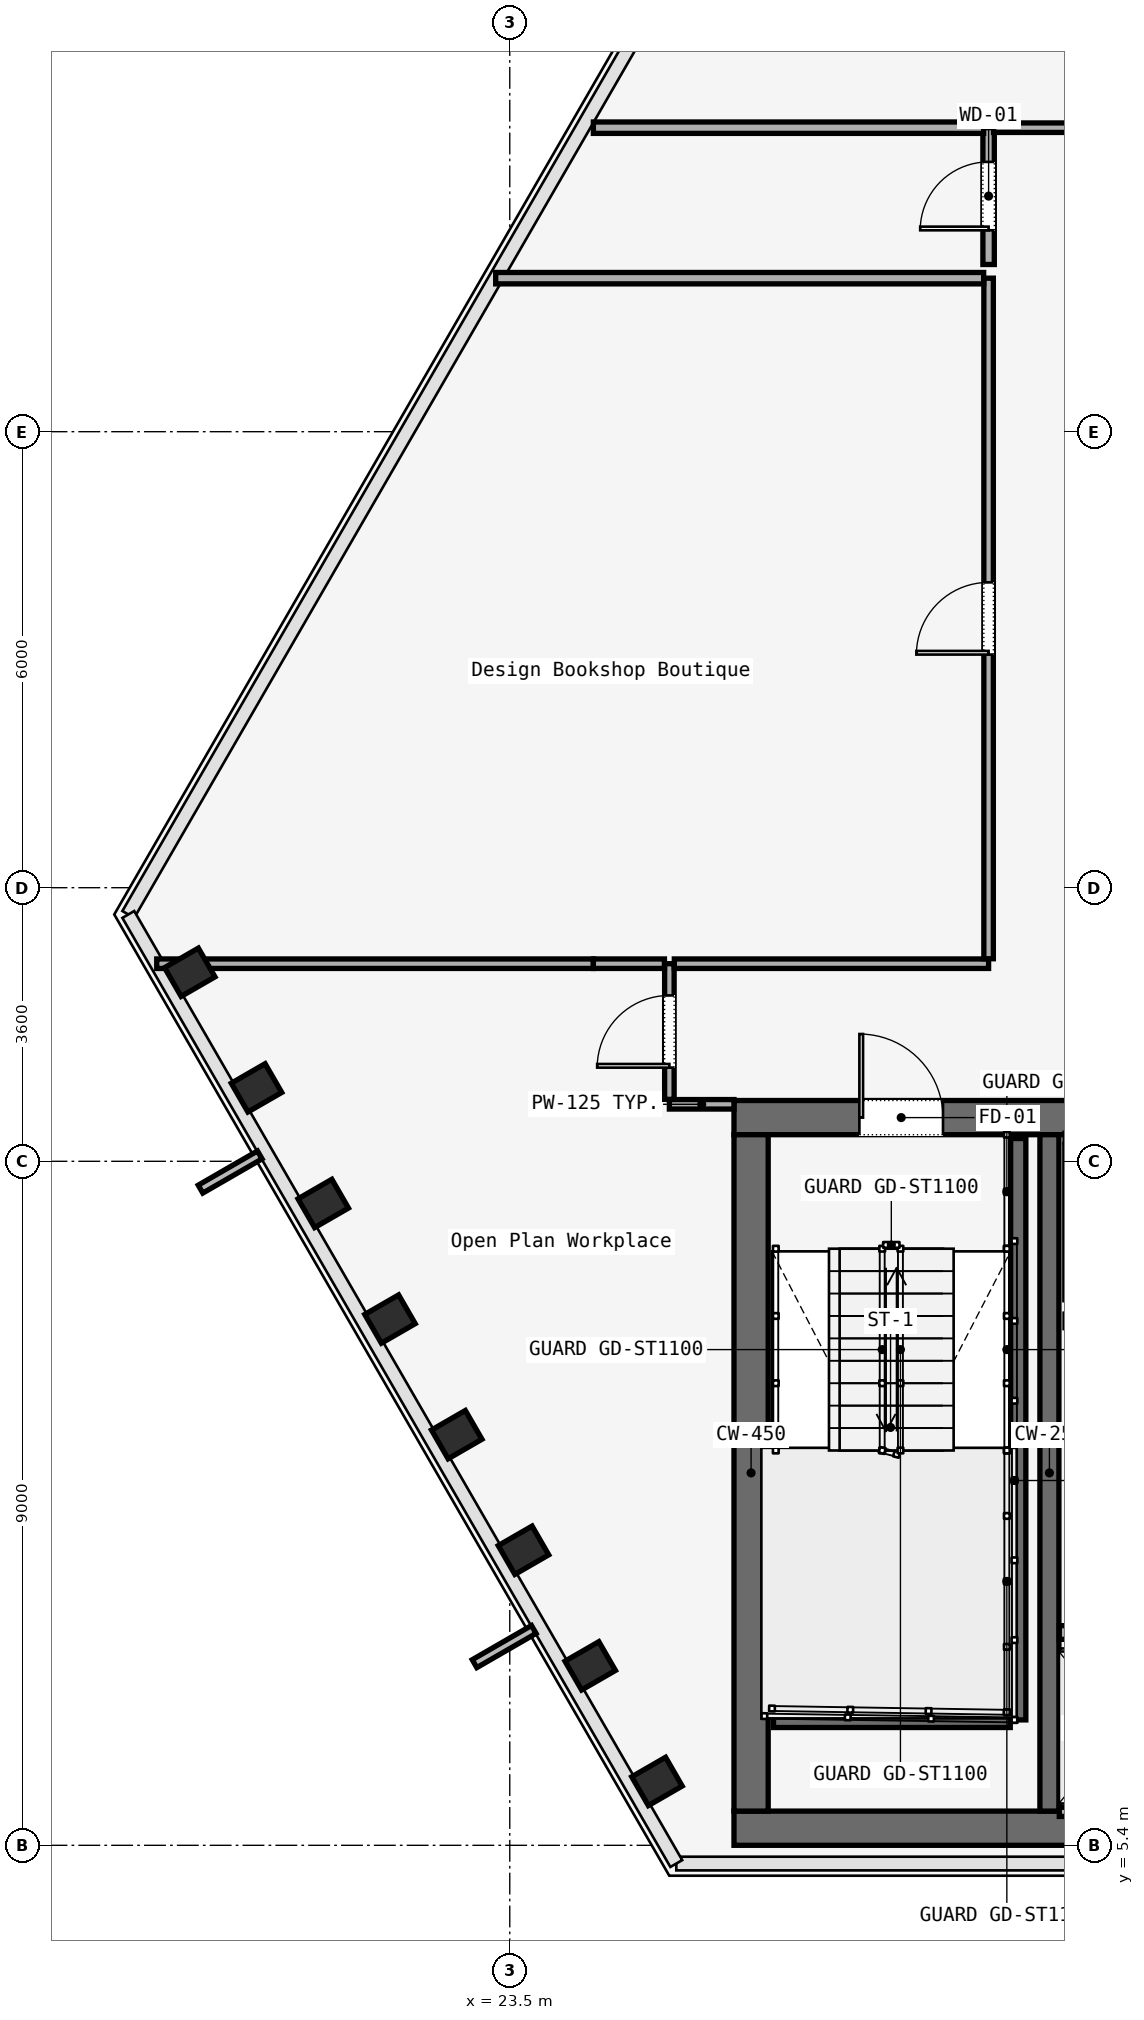
"""IFC4 building model, lengths in metres.
Left out: names, types, materials, properties, quantities, classifications, styles, units other than length and angle.
Written with IfcOpenShell. Run it as: python <this file> out.ifc"""

import sys

from ifc_helpers import new_model, si_unit, direction, frame, frame_2d, origin, origin_2d, place, context, subcontext, project, spatial, rectangle, i_section, extrude, element, fill, save


model = new_model("IFC4")
c1 = context("Model", 3, precision=1e-05, world=origin(), true_north=direction((0.0, 1.0)))
c2 = subcontext(c1, "Body", "Model", "MODEL_VIEW")
j1 = project(units=[si_unit("LENGTHUNIT", "METRE"), si_unit("PLANEANGLEUNIT", "RADIAN")], contexts=[c1])
p1 = place(None, origin())
s1 = spatial("IfcSite", under=j1, at=p1, CompositionType="ELEMENT")
p2 = place(p1, origin())
s2 = spatial("IfcBuilding", under=s1, at=p2, CompositionType="ELEMENT")
p3 = place(p2, frame((0.0, 0.0, 89.2)))
s3 = spatial("IfcBuildingStorey", under=s2, at=p3, CompositionType="ELEMENT", Elevation=89.2)
p4 = place(p3, frame((26.45, 14.975, 0.0), z_axis=(0.0, 0.0, 1.0), x_axis=(1.0, 0.0, 0.0)))
e1 = element("IfcWall", 1, at=p4, inside=s3, PredefinedType="SOLIDWALL", context=c2, shape_type="SweptSolid", body=[
    extrude(rectangle(XDim=31.1, YDim=0.45, at=frame_2d((15.55, 0.0))), origin(), (0.0, 0.0, 1.0), 3.58),
])
p5 = place(p4, frame((1.65, 0.0, 0.0)))
e2 = element("IfcOpeningElement", 2, at=p5, cuts=e1, PredefinedType="OPENING", context=c2, shape_type="SweptSolid", body=[
    extrude(rectangle(XDim=1.1, YDim=2.2, at=frame_2d((0.55, 1.1))), frame((0.0, 0.225, 0.0), z_axis=(0.0, -1.0, 0.0), x_axis=(1.0, 0.0, 0.0)), (0.0, 0.0, 1.0), 0.45),
])
p6 = place(p4, frame((13.65, 0.0, 0.0)))
e3 = element("IfcOpeningElement", 3, at=p6, cuts=e1, PredefinedType="OPENING", context=c2, shape_type="SweptSolid", body=[
    extrude(rectangle(XDim=1.1, YDim=2.2, at=frame_2d((0.55, 1.1))), frame((0.0, 0.225, 0.0), z_axis=(0.0, -1.0, 0.0), x_axis=(1.0, 0.0, 0.0)), (0.0, 0.0, 1.0), 0.45),
])
p7 = place(p4, frame((25.55, 0.0, 0.0)))
e4 = element("IfcOpeningElement", 4, at=p7, cuts=e1, PredefinedType="OPENING", context=c2, shape_type="SweptSolid", body=[
    extrude(rectangle(XDim=1.1, YDim=2.2, at=frame_2d((0.55, 1.1))), frame((0.0, 0.225, 0.0), z_axis=(0.0, -1.0, 0.0), x_axis=(1.0, 0.0, 0.0)), (0.0, 0.0, 1.0), 0.45),
])
p8 = place(p4, frame((10.7, 0.0, 0.0)))
e5 = element("IfcOpeningElement", 5, at=p8, cuts=e1, PredefinedType="OPENING", context=c2, shape_type="SweptSolid", body=[
    extrude(rectangle(XDim=1.4, YDim=2.2, at=frame_2d((0.7, 1.1))), frame((0.0, 0.225, 0.0), z_axis=(0.0, -1.0, 0.0), x_axis=(1.0, 0.0, 0.0)), (0.0, 0.0, 1.0), 0.45),
])
p9 = place(p4, frame((19.35, 0.0, 0.0)))
e6 = element("IfcOpeningElement", 6, at=p9, cuts=e1, PredefinedType="OPENING", context=c2, shape_type="SweptSolid", body=[
    extrude(rectangle(XDim=1.1, YDim=2.2, at=frame_2d((0.55, 1.1))), frame((0.0, 0.225, 0.0), z_axis=(0.0, -1.0, 0.0), x_axis=(1.0, 0.0, 0.0)), (0.0, 0.0, 1.0), 0.45),
])
p10 = place(p4, frame((21.4, 0.0, 0.0)))
e7 = element("IfcOpeningElement", 7, at=p10, cuts=e1, PredefinedType="OPENING", context=c2, shape_type="SweptSolid", body=[
    extrude(rectangle(XDim=0.9, YDim=2.1, at=frame_2d((0.45, 1.05))), frame((0.0, 0.225, 0.0), z_axis=(0.0, -1.0, 0.0), x_axis=(1.0, 0.0, 0.0)), (0.0, 0.0, 1.0), 0.45),
])
p11 = place(p4, frame((23.35, 0.0, 0.0)))
e8 = element("IfcOpeningElement", 8, at=p11, cuts=e1, PredefinedType="OPENING", context=c2, shape_type="SweptSolid", body=[
    extrude(rectangle(XDim=1.3, YDim=2.3, at=frame_2d((0.65, 1.15))), frame((0.0, 0.225, 0.0), z_axis=(0.0, -1.0, 0.0), x_axis=(1.0, 0.0, 0.0)), (0.0, 0.0, 1.0), 0.45),
])
p12 = place(p3, frame((26.45, 5.625, 0.0), z_axis=(0.0, 0.0, 1.0), x_axis=(1.0, 0.0, 0.0)))
e9 = element("IfcWall", 9, at=p12, inside=s3, PredefinedType="SOLIDWALL", context=c2, shape_type="SweptSolid", body=[
    extrude(rectangle(XDim=31.1, YDim=0.45, at=frame_2d((15.55, 0.0))), origin(), (0.0, 0.0, 1.0), 3.58),
])
p13 = place(p3, frame((26.675, 5.85, 0.0), z_axis=(0.0, 0.0, 1.0), x_axis=(0.0, 1.0, 0.0)))
e10 = element("IfcWall", 10, at=p13, inside=s3, PredefinedType="SOLIDWALL", context=c2, shape_type="SweptSolid", body=[
    extrude(rectangle(XDim=8.9, YDim=0.45, at=frame_2d((4.45, 0.0))), origin(), (0.0, 0.0, 1.0), 3.58),
])
p14 = place(p3, frame((30.6, 5.85, 0.0), z_axis=(0.0, 0.0, 1.0), x_axis=(0.0, 1.0, 0.0)))
e11 = element("IfcWall", 11, at=p14, inside=s3, PredefinedType="SOLIDWALL", context=c2, shape_type="SweptSolid", body=[
    extrude(rectangle(XDim=8.9, YDim=0.25, at=frame_2d((4.45, 0.0))), origin(), (0.0, 0.0, 1.0), 3.58),
])
p15 = place(p3, frame((19.29, 16.887, 0.0), z_axis=(-0.011025598109, -0.126557632283, 0.991897979581), x_axis=(-0.423559529264, 0.899162680827, 0.110017264904)))
e12 = element("IfcColumn", 12, at=p15, inside=s3, PredefinedType="COLUMN", context=c2, shape_type="SweptSolid", body=[
    extrude(i_section(OverallWidth=0.437, OverallDepth=0.514, WebThickness=0.061, FlangeThickness=0.077, FilletRadius=0.015, at=origin_2d()), origin(), (0.0, 0.0, 1.0), 3.609),
])
p16 = place(p3, frame((20.168, 15.366, 0.0), z_axis=(-0.020804367699, -0.109849772116, 0.993730449292), x_axis=(-0.331126240507, 0.938605650545, 0.096823786395)))
e13 = element("IfcColumn", 13, at=p16, inside=s3, PredefinedType="COLUMN", context=c2, shape_type="SweptSolid", body=[
    extrude(i_section(OverallWidth=0.437, OverallDepth=0.514, WebThickness=0.061, FlangeThickness=0.077, FilletRadius=0.015, at=origin_2d()), origin(), (0.0, 0.0, 1.0), 3.603),
])
p17 = place(p3, frame((21.046, 13.845, 0.0), z_axis=(-0.030539703682, -0.093112163226, 0.995187143988), x_axis=(-0.206497376951, 0.974759930435, 0.084864075622)))
e14 = element("IfcColumn", 14, at=p17, inside=s3, PredefinedType="COLUMN", context=c2, shape_type="SweptSolid", body=[
    extrude(i_section(OverallWidth=0.437, OverallDepth=0.514, WebThickness=0.061, FlangeThickness=0.077, FilletRadius=0.015, at=origin_2d()), origin(), (0.0, 0.0, 1.0), 3.597),
])
p18 = place(p3, frame((21.924, 12.324, 0.0), z_axis=(-0.040424026835, -0.076296104429, 0.996265427737), x_axis=(-0.037878466592, 0.996480719154, 0.074775651936)))
e15 = element("IfcColumn", 15, at=p18, inside=s3, PredefinedType="COLUMN", context=c2, shape_type="SweptSolid", body=[
    extrude(i_section(OverallWidth=0.437, OverallDepth=0.514, WebThickness=0.061, FlangeThickness=0.077, FilletRadius=0.015, at=origin_2d()), origin(), (0.0, 0.0, 1.0), 3.594),
])
p19 = place(p3, frame((22.802, 10.803, 0.0), z_axis=(-0.050175104004, -0.059353476687, 0.996975237277), x_axis=(0.175563131942, 0.982164601536, 0.067307371012)))
e16 = element("IfcColumn", 16, at=p19, inside=s3, PredefinedType="COLUMN", context=c2, shape_type="SweptSolid", body=[
    extrude(i_section(OverallWidth=0.437, OverallDepth=0.514, WebThickness=0.061, FlangeThickness=0.077, FilletRadius=0.015, at=origin_2d()), origin(), (0.0, 0.0, 1.0), 3.591),
])
p20 = place(p3, frame((23.68, 9.282, 0.0), z_axis=(-0.059984707223, -0.042438160212, 0.997296764989), x_axis=(0.41629274108, 0.907001092511, 0.063634675352)))
e17 = element("IfcColumn", 17, at=p20, inside=s3, PredefinedType="COLUMN", context=c2, shape_type="SweptSolid", body=[
    extrude(i_section(OverallWidth=0.437, OverallDepth=0.514, WebThickness=0.061, FlangeThickness=0.077, FilletRadius=0.015, at=origin_2d()), origin(), (0.0, 0.0, 1.0), 3.59),
])
p21 = place(p3, frame((24.559, 7.761, 0.0), z_axis=(-0.069841728492, -0.02543408613, 0.997233794165), x_axis=(0.640403196751, 0.765336642111, 0.064370566504)))
e18 = element("IfcColumn", 18, at=p21, inside=s3, PredefinedType="COLUMN", context=c2, shape_type="SweptSolid", body=[
    extrude(i_section(OverallWidth=0.437, OverallDepth=0.514, WebThickness=0.061, FlangeThickness=0.077, FilletRadius=0.015, at=origin_2d()), origin(), (0.0, 0.0, 1.0), 3.59),
])
p22 = place(p3, frame((25.437, 6.24, 0.0), z_axis=(-0.079599151352, -0.008496920511, 0.996790739045), x_axis=(0.805297814331, 0.588803246695, 0.069326523896)))
e19 = element("IfcColumn", 19, at=p22, inside=s3, PredefinedType="COLUMN", context=c2, shape_type="SweptSolid", body=[
    extrude(i_section(OverallWidth=0.437, OverallDepth=0.514, WebThickness=0.061, FlangeThickness=0.077, FilletRadius=0.015, at=origin_2d()), origin(), (0.0, 0.0, 1.0), 3.592),
])
p23 = place(p3, frame((30.19, 14.7, 0.0), z_axis=(0.0, 0.0, 1.0), x_axis=(0.0, -1.0, 0.0)))
e20 = element("IfcWall", 20, at=p23, inside=s3, PredefinedType="SOLIDWALL", context=c2, shape_type="SweptSolid", body=[
    extrude(rectangle(XDim=7.65, YDim=0.2, at=frame_2d((3.825, 0.0))), origin(), (0.0, 0.0, 1.0), 3.8),
])
p24 = place(p3, frame((26.97, 7.05, 0.0), z_axis=(0.0, 0.0, 1.0), x_axis=(1.0, 0.0, 0.0)))
e21 = element("IfcWall", 21, at=p24, inside=s3, PredefinedType="SOLIDWALL", context=c2, shape_type="SweptSolid", body=[
    extrude(rectangle(XDim=3.115, YDim=0.2, at=frame_2d((1.558, 0.0))), origin(), (0.0, 0.0, 1.0), 3.8),
])
p25 = place(p3, frame((30.73, 8.2, 0.0), z_axis=(0.0, 0.0, 1.0), x_axis=(1.0, 0.0, 0.0)))
e22 = element("IfcWall", 22, at=p25, inside=s3, PredefinedType="SOLIDWALL", context=c2, shape_type="SweptSolid", body=[
    extrude(rectangle(XDim=1.665, YDim=0.18, at=frame_2d((0.833, 0.0))), origin(), (0.0, 0.0, 1.0), 2.95),
])
p26 = place(p25, frame((0.282, 0.0, 0.0)))
e23 = element("IfcOpeningElement", 23, at=p26, cuts=e22, PredefinedType="OPENING", context=c2, shape_type="SweptSolid", body=[
    extrude(rectangle(XDim=1.1, YDim=2.2, at=frame_2d((0.55, 1.1))), frame((0.0, 0.09, 0.0), z_axis=(0.0, -1.0, 0.0), x_axis=(1.0, 0.0, 0.0)), (0.0, 0.0, 1.0), 0.18),
])
p27 = place(p3, frame((30.73, 5.84, 0.0), z_axis=(0.0, 0.0, 1.0), x_axis=(1.0, 0.0, 0.0)))
e24 = element("IfcWall", 24, at=p27, inside=s3, PredefinedType="SOLIDWALL", context=c2, shape_type="SweptSolid", body=[
    extrude(rectangle(XDim=1.665, YDim=0.12, at=frame_2d((0.833, 0.0))), origin(), (0.0, 0.0, 1.0), 2.95),
])
p28 = place(p3, frame((26.45, 15.15, 0.0), z_axis=(0.0, 0.0, 1.0), x_axis=(-1.0, 0.0, 0.0)))
e25 = element("IfcWall", 25, at=p28, inside=s3, PredefinedType="PARTITIONING", context=c2, shape_type="SweptSolid", body=[
    extrude(rectangle(XDim=0.85, YDim=0.125, at=frame_2d((0.425, 0.0))), origin(), (0.0, 0.0, 1.0), 2.95),
])
p29 = place(p3, frame((25.6, 15.215, 0.0), z_axis=(0.0, 0.0, 1.0), x_axis=(0.0, 1.0, 0.0)))
e26 = element("IfcWall", 26, at=p29, inside=s3, PredefinedType="PARTITIONING", context=c2, shape_type="SweptSolid", body=[
    extrude(rectangle(XDim=1.785, YDim=0.125, at=frame_2d((0.893, 0.0))), origin(), (0.0, 0.0, 1.0), 2.95),
])
p30 = place(p29, frame((0.417, 0.0, 0.0)))
e27 = element("IfcOpeningElement", 27, at=p30, cuts=e26, PredefinedType="OPENING", context=c2, shape_type="SweptSolid", body=[
    extrude(rectangle(XDim=0.95, YDim=2.2, at=frame_2d((0.475, 1.1))), frame((0.0, 0.062, 0.0), z_axis=(0.0, -1.0, 0.0), x_axis=(1.0, 0.0, 0.0)), (0.0, 0.0, 1.0), 0.125),
])
p31 = place(p3, frame((25.665, 17.0, 0.0), z_axis=(0.0, 0.0, 1.0), x_axis=(1.0, 0.0, 0.0)))
e28 = element("IfcWall", 28, at=p31, inside=s3, PredefinedType="PARTITIONING", context=c2, shape_type="SweptSolid", body=[
    extrude(rectangle(XDim=4.135, YDim=0.125, at=frame_2d((2.067, 0.0))), origin(), (0.0, 0.0, 1.0), 2.95),
])
p32 = place(p3, frame((29.8, 17.065, 0.0), z_axis=(0.0, 0.0, 1.0), x_axis=(0.0, 1.0, 0.0)))
e29 = element("IfcWall", 29, at=p32, inside=s3, PredefinedType="PARTITIONING", context=c2, shape_type="SweptSolid", body=[
    extrude(rectangle(XDim=8.955, YDim=0.125, at=frame_2d((4.478, 0.0))), origin(), (0.0, 0.0, 1.0), 2.95),
])
p33 = place(p32, frame((4.002, 0.0, 0.0)))
e30 = element("IfcOpeningElement", 30, at=p33, cuts=e29, PredefinedType="OPENING", context=c2, shape_type="SweptSolid", body=[
    extrude(rectangle(XDim=0.95, YDim=2.2, at=frame_2d((0.475, 1.1))), frame((0.0, 0.062, 0.0), z_axis=(0.0, -1.0, 0.0), x_axis=(1.0, 0.0, 0.0)), (0.0, 0.0, 1.0), 0.125),
])
p34 = place(p3, frame((29.8, 26.2, 0.0), z_axis=(0.0, 0.0, 1.0), x_axis=(0.0, 1.0, 0.0)))
e31 = element("IfcWall", 31, at=p34, inside=s3, PredefinedType="PARTITIONING", context=c2, shape_type="SweptSolid", body=[
    extrude(rectangle(XDim=1.8, YDim=0.15, at=frame_2d((0.9, 0.0))), origin(), (0.0, 0.0, 1.0), 2.95),
])
p35 = place(p34, frame((0.45, 0.0, 0.0)))
e32 = element("IfcOpeningElement", 32, at=p35, cuts=e31, PredefinedType="OPENING", context=c2, shape_type="SweptSolid", body=[
    extrude(rectangle(XDim=0.9, YDim=2.15, at=frame_2d((0.45, 1.075))), frame((0.0, 0.075, 0.0), z_axis=(0.0, -1.0, 0.0), x_axis=(1.0, 0.0, 0.0)), (0.0, 0.0, 1.0), 0.15),
])
p36 = place(p3, frame((29.865, 28.0, 0.0), z_axis=(0.0, 0.0, 1.0), x_axis=(1.0, 0.0, 0.0)))
e33 = element("IfcWall", 33, at=p36, inside=s3, PredefinedType="PARTITIONING", context=c2, shape_type="SweptSolid", body=[
    extrude(rectangle(XDim=1.735, YDim=0.125, at=frame_2d((0.868, 0.0))), origin(), (0.0, 0.0, 1.0), 2.95),
])
p37 = place(p3, frame((18.855, 17.0, 0.0), z_axis=(0.0, 0.0, 1.0), x_axis=(1.0, 0.0, 0.0)))
e34 = element("IfcWall", 34, at=p37, inside=s3, PredefinedType="PARTITIONING", context=c2, shape_type="SweptSolid", body=[
    extrude(rectangle(XDim=5.745, YDim=0.125, at=frame_2d((2.873, 0.0))), origin(), (0.0, 0.0, 1.0), 2.95),
])
p38 = place(p3, frame((24.6, 17.0, 0.0), z_axis=(0.0, 0.0, 1.0), x_axis=(1.0, 0.0, 0.0)))
e35 = element("IfcWall", 35, at=p38, inside=s3, PredefinedType="PARTITIONING", context=c2, shape_type="SweptSolid", body=[
    extrude(rectangle(XDim=0.935, YDim=0.125, at=frame_2d((0.467, 0.0))), origin(), (0.0, 0.0, 1.0), 2.95),
])
p39 = place(p3, frame((23.315, 26.02, 0.0), z_axis=(0.0, 0.0, 1.0), x_axis=(1.0, 0.0, 0.0)))
e36 = element("IfcWall", 36, at=p39, inside=s3, PredefinedType="PARTITIONING", context=c2, shape_type="SweptSolid", body=[
    extrude(rectangle(XDim=6.42, YDim=0.15, at=frame_2d((3.21, 0.0))), origin(), (0.0, 0.0, 1.0), 2.95),
])
p40 = place(p3, frame((24.6, 28.0, 0.0), z_axis=(0.0, 0.0, 1.0), x_axis=(1.0, 0.0, 0.0)))
e37 = element("IfcWall", 37, at=p40, inside=s3, PredefinedType="PARTITIONING", context=c2, shape_type="SweptSolid", body=[
    extrude(rectangle(XDim=5.135, YDim=0.15, at=frame_2d((2.567, 0.0))), origin(), (0.0, 0.0, 1.0), 2.95),
])
p41 = place(p5, origin())
e38 = element("IfcDoor", 38, at=p41, inside=s3, OperationType="SINGLE_SWING_LEFT", PredefinedType="DOOR", context=c2, shape_type="SweptSolid", body=[
    extrude(rectangle(XDim=1.1, YDim=2.2, at=frame_2d((0.55, 1.1))), frame((0.0, 0.025, 0.0), z_axis=(0.0, -1.0, 0.0), x_axis=(1.0, 0.0, 0.0)), (0.0, 0.0, 1.0), 0.05),
])
fill(e2, e38)
p42 = place(p30, origin())
e39 = element("IfcDoor", 39, at=p42, inside=s3, OperationType="SINGLE_SWING_LEFT", PredefinedType="DOOR", context=c2, shape_type="SweptSolid", body=[
    extrude(rectangle(XDim=0.95, YDim=2.2, at=frame_2d((0.475, 1.1))), frame((0.0, 0.025, 0.0), z_axis=(0.0, -1.0, 0.0), x_axis=(1.0, 0.0, 0.0)), (0.0, 0.0, 1.0), 0.05),
])
fill(e27, e39)
p43 = place(p33, origin())
e40 = element("IfcDoor", 40, at=p43, inside=s3, OperationType="SINGLE_SWING_LEFT", PredefinedType="DOOR", context=c2, shape_type="SweptSolid", body=[
    extrude(rectangle(XDim=0.95, YDim=2.2, at=frame_2d((0.475, 1.1))), frame((0.0, 0.025, 0.0), z_axis=(0.0, -1.0, 0.0), x_axis=(1.0, 0.0, 0.0)), (0.0, 0.0, 1.0), 0.05),
])
fill(e30, e40)
p44 = place(p35, origin())
e41 = element("IfcDoor", 41, at=p44, inside=s3, OperationType="SINGLE_SWING_RIGHT", PredefinedType="DOOR", context=c2, shape_type="SweptSolid", body=[
    extrude(rectangle(XDim=0.9, YDim=2.15, at=frame_2d((0.45, 1.075))), frame((0.0, 0.025, 0.0), z_axis=(0.0, -1.0, 0.0), x_axis=(1.0, 0.0, 0.0)), (0.0, 0.0, 1.0), 0.05),
])
fill(e32, e41)
save(model, sys.argv[1])
